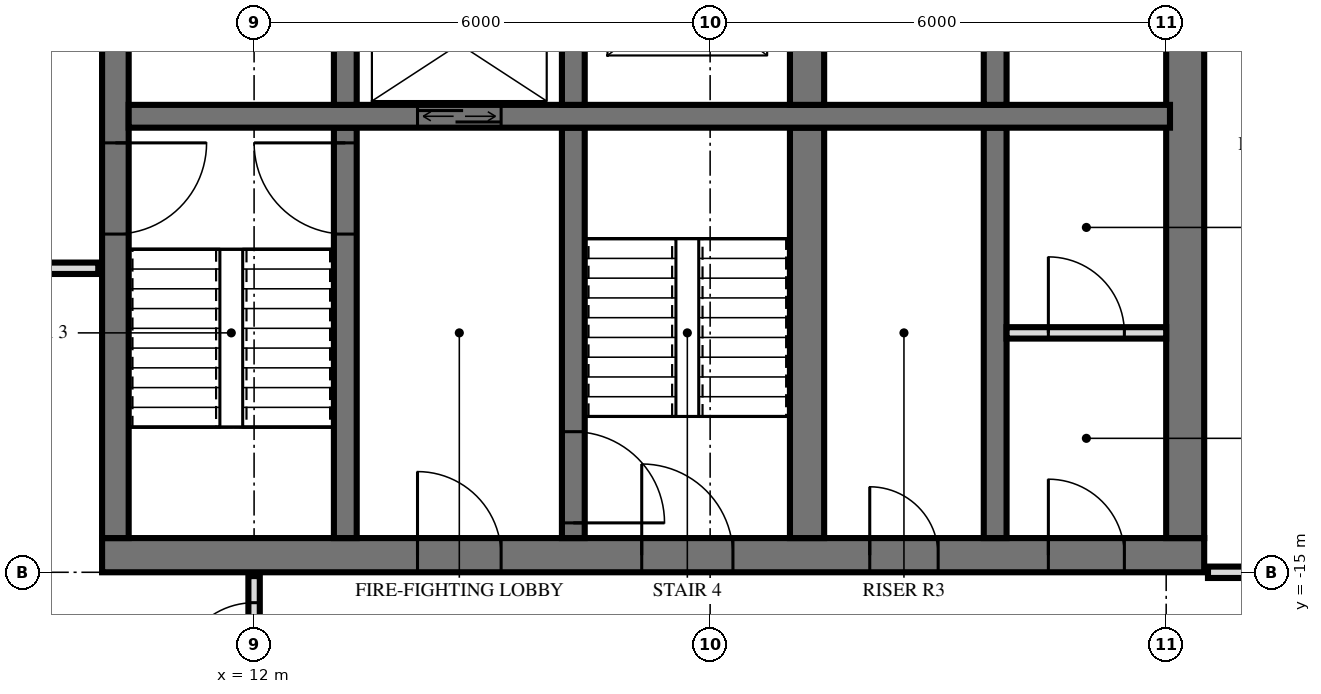
"""IFC4 building model, lengths in metres.
Left out: names, types, materials, properties, quantities, classifications, styles, units other than length and angle.
Written with IfcOpenShell. Run it as: python <this file> out.ifc"""

import sys

from ifc_helpers import new_model, si_unit, direction, frame, frame_2d, origin, place, context, subcontext, project, spatial, rectangle, extrude, element, fill, save


model = new_model("IFC4")
c1 = context("Model", 3, precision=1e-05, world=origin(), true_north=direction((0.0, 1.0)))
c2 = subcontext(c1, "Body", "Model", "MODEL_VIEW")
j1 = project(units=[si_unit("LENGTHUNIT", "METRE"), si_unit("PLANEANGLEUNIT", "RADIAN")], contexts=[c1])
p1 = place(None, origin())
s1 = spatial("IfcSite", under=j1, at=p1, CompositionType="ELEMENT")
p2 = place(p1, origin())
s2 = spatial("IfcBuilding", under=s1, at=p2, CompositionType="ELEMENT")
p3 = place(p2, frame((0.0, 0.0, 116.4)))
s3 = spatial("IfcBuildingStorey", under=s2, at=p3, CompositionType="ELEMENT", Elevation=116.4)
p4 = place(p3, frame((10.0, -14.775, 0.0), z_axis=(0.0, 0.0, 1.0), x_axis=(1.0, 0.0, 0.0)))
e1 = element("IfcWall", 1, at=p4, inside=s3, PredefinedType="SHEAR", context=c2, shape_type="SweptSolid", body=[
    extrude(rectangle(XDim=14.5, YDim=0.45, at=frame_2d((7.25, 0.0))), origin(), (0.0, 0.0, 1.0), 3.6),
])
p5 = place(p4, frame((7.1, 0.0, 0.0)))
e2 = element("IfcOpeningElement", 2, at=p5, cuts=e1, PredefinedType="OPENING", context=c2, shape_type="SweptSolid", body=[
    extrude(rectangle(XDim=1.2, YDim=2.1, at=frame_2d((0.6, 1.05))), frame((0.0, 0.235, 0.0), z_axis=(0.0, -1.0, 0.0), x_axis=(1.0, 0.0, 0.0)), (0.0, 0.0, 1.0), 0.47),
])
p6 = place(p4, frame((4.15, 0.0, 0.0)))
e3 = element("IfcOpeningElement", 3, at=p6, cuts=e1, PredefinedType="OPENING", context=c2, shape_type="SweptSolid", body=[
    extrude(rectangle(XDim=1.1, YDim=2.1, at=frame_2d((0.55, 1.05))), frame((0.0, 0.235, 0.0), z_axis=(0.0, -1.0, 0.0), x_axis=(1.0, 0.0, 0.0)), (0.0, 0.0, 1.0), 0.47),
])
p7 = place(p4, frame((10.1, 0.0, 0.0)))
e4 = element("IfcOpeningElement", 4, at=p7, cuts=e1, PredefinedType="OPENING", context=c2, shape_type="SweptSolid", body=[
    extrude(rectangle(XDim=0.9, YDim=2.1, at=frame_2d((0.45, 1.05))), frame((0.0, 0.235, 0.0), z_axis=(0.0, -1.0, 0.0), x_axis=(1.0, 0.0, 0.0)), (0.0, 0.0, 1.0), 0.47),
])
p8 = place(p4, frame((12.45, 0.0, 0.0)))
e5 = element("IfcOpeningElement", 5, at=p8, cuts=e1, PredefinedType="OPENING", context=c2, shape_type="SweptSolid", body=[
    extrude(rectangle(XDim=1.0, YDim=2.1, at=frame_2d((0.5, 1.05))), frame((0.0, 0.235, 0.0), z_axis=(0.0, -1.0, 0.0), x_axis=(1.0, 0.0, 0.0)), (0.0, 0.0, 1.0), 0.47),
])
p9 = place(p3, frame((10.175, -14.55, 0.0), z_axis=(0.0, 0.0, 1.0), x_axis=(0.0, 1.0, 0.0)))
e6 = element("IfcWall", 6, at=p9, inside=s3, PredefinedType="SHEAR", context=c2, shape_type="SweptSolid", body=[
    extrude(rectangle(XDim=14.1, YDim=0.35, at=frame_2d((7.05, 0.0))), origin(), (0.0, 0.0, 1.0), 3.6),
])
p10 = place(p9, frame((8.4, 0.0, 0.0)))
e7 = element("IfcOpeningElement", 7, at=p10, cuts=e6, PredefinedType="OPENING", context=c2, shape_type="SweptSolid", body=[
    extrude(rectangle(XDim=1.4, YDim=2.4, at=frame_2d((0.7, 1.2))), frame((0.0, 0.185, 0.0), z_axis=(0.0, -1.0, 0.0), x_axis=(1.0, 0.0, 0.0)), (0.0, 0.0, 1.0), 0.37),
])
p11 = place(p9, frame((10.0, 0.0, 0.0)))
e8 = element("IfcOpeningElement", 8, at=p11, cuts=e6, PredefinedType="OPENING", context=c2, shape_type="SweptSolid", body=[
    extrude(rectangle(XDim=1.4, YDim=2.4, at=frame_2d((0.7, 1.2))), frame((0.0, 0.185, 0.0), z_axis=(0.0, -1.0, 0.0), x_axis=(1.0, 0.0, 0.0)), (0.0, 0.0, 1.0), 0.37),
])
p12 = place(p9, frame((4.0, 0.0, 0.0)))
e9 = element("IfcOpeningElement", 9, at=p12, cuts=e6, PredefinedType="OPENING", context=c2, shape_type="SweptSolid", body=[
    extrude(rectangle(XDim=1.2, YDim=2.1, at=frame_2d((0.6, 1.05))), frame((0.0, 0.185, 0.0), z_axis=(0.0, -1.0, 0.0), x_axis=(1.0, 0.0, 0.0)), (0.0, 0.0, 1.0), 0.37),
])
p13 = place(p3, frame((24.25, -14.55, 0.0), z_axis=(0.0, 0.0, 1.0), x_axis=(0.0, 1.0, 0.0)))
e10 = element("IfcWall", 10, at=p13, inside=s3, PredefinedType="SHEAR", context=c2, shape_type="SweptSolid", body=[
    extrude(rectangle(XDim=14.1, YDim=0.5, at=frame_2d((7.05, 0.0))), origin(), (0.0, 0.0, 1.0), 3.6),
])
p14 = place(p3, frame((10.35, -9.0, 0.0), z_axis=(0.0, 0.0, 1.0), x_axis=(1.0, 0.0, 0.0)))
e11 = element("IfcWall", 11, at=p14, inside=s3, PredefinedType="SHEAR", context=c2, shape_type="SweptSolid", body=[
    extrude(rectangle(XDim=13.7, YDim=0.3, at=frame_2d((6.85, 0.0))), origin(), (0.0, 0.0, 1.0), 3.6),
])
p15 = place(p14, frame((3.8, 0.0, 0.0)))
e12 = element("IfcOpeningElement", 12, at=p15, cuts=e11, PredefinedType="OPENING", context=c2, shape_type="SweptSolid", body=[
    extrude(rectangle(XDim=1.1, YDim=2.1, at=frame_2d((0.55, 1.05))), frame((0.0, 0.16, 0.0), z_axis=(0.0, -1.0, 0.0), x_axis=(1.0, 0.0, 0.0)), (0.0, 0.0, 1.0), 0.32),
])
p16 = place(p3, frame((13.2, -8.85, 0.0), z_axis=(0.0, 0.0, 1.0), x_axis=(0.0, 1.0, 0.0)))
e13 = element("IfcWall", 13, at=p16, inside=s3, PredefinedType="SHEAR", context=c2, shape_type="SweptSolid", body=[
    extrude(rectangle(XDim=2.3, YDim=0.3, at=frame_2d((1.15, 0.0))), origin(), (0.0, 0.0, 1.0), 3.6),
])
p17 = place(p3, frame((13.2, -14.55, 0.0), z_axis=(0.0, 0.0, 1.0), x_axis=(0.0, 1.0, 0.0)))
e14 = element("IfcWall", 14, at=p17, inside=s3, PredefinedType="SHEAR", context=c2, shape_type="SweptSolid", body=[
    extrude(rectangle(XDim=5.4, YDim=0.3, at=frame_2d((2.7, 0.0))), origin(), (0.0, 0.0, 1.0), 3.6),
])
p18 = place(p17, frame((4.0, 0.0, 0.0)))
e15 = element("IfcOpeningElement", 15, at=p18, cuts=e14, PredefinedType="OPENING", context=c2, shape_type="SweptSolid", body=[
    extrude(rectangle(XDim=1.2, YDim=2.1, at=frame_2d((0.6, 1.05))), frame((0.0, 0.16, 0.0), z_axis=(0.0, -1.0, 0.0), x_axis=(1.0, 0.0, 0.0)), (0.0, 0.0, 1.0), 0.32),
])
p19 = place(p3, frame((16.2, -8.85, 0.0), z_axis=(0.0, 0.0, 1.0), x_axis=(0.0, 1.0, 0.0)))
e16 = element("IfcWall", 16, at=p19, inside=s3, PredefinedType="SHEAR", context=c2, shape_type="SweptSolid", body=[
    extrude(rectangle(XDim=2.3, YDim=0.3, at=frame_2d((1.15, 0.0))), origin(), (0.0, 0.0, 1.0), 3.6),
])
p20 = place(p3, frame((16.2, -14.55, 0.0), z_axis=(0.0, 0.0, 1.0), x_axis=(0.0, 1.0, 0.0)))
e17 = element("IfcWall", 17, at=p20, inside=s3, PredefinedType="SHEAR", context=c2, shape_type="SweptSolid", body=[
    extrude(rectangle(XDim=5.4, YDim=0.3, at=frame_2d((2.7, 0.0))), origin(), (0.0, 0.0, 1.0), 3.6),
])
p21 = place(p20, frame((0.2, 0.0, 0.0)))
e18 = element("IfcOpeningElement", 18, at=p21, cuts=e17, PredefinedType="OPENING", context=c2, shape_type="SweptSolid", body=[
    extrude(rectangle(XDim=1.2, YDim=2.1, at=frame_2d((0.6, 1.05))), frame((0.0, 0.16, 0.0), z_axis=(0.0, -1.0, 0.0), x_axis=(1.0, 0.0, 0.0)), (0.0, 0.0, 1.0), 0.32),
])
p22 = place(p3, frame((19.275, -8.85, 0.0), z_axis=(0.0, 0.0, 1.0), x_axis=(0.0, 1.0, 0.0)))
e19 = element("IfcWall", 19, at=p22, inside=s3, PredefinedType="SHEAR", context=c2, shape_type="SweptSolid", body=[
    extrude(rectangle(XDim=2.3, YDim=0.45, at=frame_2d((1.15, 0.0))), origin(), (0.0, 0.0, 1.0), 3.6),
])
p23 = place(p3, frame((19.275, -14.55, 0.0), z_axis=(0.0, 0.0, 1.0), x_axis=(0.0, 1.0, 0.0)))
e20 = element("IfcWall", 20, at=p23, inside=s3, PredefinedType="SHEAR", context=c2, shape_type="SweptSolid", body=[
    extrude(rectangle(XDim=5.4, YDim=0.45, at=frame_2d((2.7, 0.0))), origin(), (0.0, 0.0, 1.0), 3.6),
])
p24 = place(p3, frame((21.75, -8.85, 0.0), z_axis=(0.0, 0.0, 1.0), x_axis=(0.0, 1.0, 0.0)))
e21 = element("IfcWall", 21, at=p24, inside=s3, PredefinedType="SHEAR", context=c2, shape_type="SweptSolid", body=[
    extrude(rectangle(XDim=2.3, YDim=0.3, at=frame_2d((1.15, 0.0))), origin(), (0.0, 0.0, 1.0), 3.6),
])
p25 = place(p3, frame((21.75, -14.55, 0.0), z_axis=(0.0, 0.0, 1.0), x_axis=(0.0, 1.0, 0.0)))
e22 = element("IfcWall", 22, at=p25, inside=s3, PredefinedType="SHEAR", context=c2, shape_type="SweptSolid", body=[
    extrude(rectangle(XDim=5.4, YDim=0.3, at=frame_2d((2.7, 0.0))), origin(), (0.0, 0.0, 1.0), 3.6),
])
p26 = place(p3, frame((21.9, -11.85, 0.0), z_axis=(0.0, 0.0, 1.0), x_axis=(1.0, 0.0, 0.0)))
e23 = element("IfcWall", 23, at=p26, inside=s3, PredefinedType="PARTITIONING", context=c2, shape_type="SweptSolid", body=[
    extrude(rectangle(XDim=2.1, YDim=0.15, at=frame_2d((1.05, 0.0))), origin(), (0.0, 0.0, 1.0), 3.3),
])
p27 = place(p26, frame((0.55, 0.0, 0.0)))
e24 = element("IfcOpeningElement", 24, at=p27, cuts=e23, PredefinedType="OPENING", context=c2, shape_type="SweptSolid", body=[
    extrude(rectangle(XDim=1.0, YDim=2.1, at=frame_2d((0.5, 1.05))), frame((0.0, 0.085, 0.0), z_axis=(0.0, -1.0, 0.0), x_axis=(1.0, 0.0, 0.0)), (0.0, 0.0, 1.0), 0.17),
])
p28 = place(p3, frame((12.0, -16.8, 0.0), z_axis=(0.0, 0.0, 1.0), x_axis=(0.0, 1.0, 0.0)))
e25 = element("IfcWall", 25, at=p28, inside=s3, PredefinedType="PARTITIONING", context=c2, shape_type="SweptSolid", body=[
    extrude(rectangle(XDim=1.75, YDim=0.15, at=frame_2d((0.875, 0.0))), origin(), (0.0, 0.0, 1.0), 3.32),
])
p29 = place(p28, frame((0.4, 0.0, 0.0)))
e26 = element("IfcOpeningElement", 26, at=p29, cuts=e25, PredefinedType="OPENING", context=c2, shape_type="SweptSolid", body=[
    extrude(rectangle(XDim=1.0, YDim=2.1, at=frame_2d((0.5, 1.05))), frame((0.0, 0.085, 0.0), z_axis=(0.0, -1.0, 0.0), x_axis=(1.0, 0.0, 0.0)), (0.0, 0.0, 1.0), 0.17),
])
p30 = place(p3, frame((24.55, -15.0, 0.0), z_axis=(0.0, 0.0, 1.0), x_axis=(1.0, 0.0, 0.0)))
e27 = element("IfcWall", 27, at=p30, inside=s3, PredefinedType="PARTITIONING", context=c2, shape_type="SweptSolid", body=[
    extrude(rectangle(XDim=3.47, YDim=0.15, at=frame_2d((1.735, 0.0))), origin(), (0.0, 0.0, 1.0), 3.32),
])
p31 = place(p30, frame((0.9, 0.0, 0.0)))
e28 = element("IfcOpeningElement", 28, at=p31, cuts=e27, PredefinedType="OPENING", context=c2, shape_type="SweptSolid", body=[
    extrude(rectangle(XDim=1.0, YDim=2.1, at=frame_2d((0.5, 1.05))), frame((0.0, 0.085, 0.0), z_axis=(0.0, -1.0, 0.0), x_axis=(1.0, 0.0, 0.0)), (0.0, 0.0, 1.0), 0.17),
])
p32 = place(p3, frame((-9.95, -11.0, 0.0), z_axis=(0.0, 0.0, 1.0), x_axis=(1.0, 0.0, 0.0)))
e29 = element("IfcWall", 29, at=p32, inside=s3, PredefinedType="PARTITIONING", context=c2, shape_type="SweptSolid", body=[
    extrude(rectangle(XDim=19.9, YDim=0.15, at=frame_2d((9.95, 0.0))), origin(), (0.0, 0.0, 1.0), 3.32),
])
p33 = place(p32, frame((9.45, 0.0, 0.0)))
e30 = element("IfcOpeningElement", 30, at=p33, cuts=e29, PredefinedType="OPENING", context=c2, shape_type="SweptSolid", body=[
    extrude(rectangle(XDim=1.0, YDim=2.1, at=frame_2d((0.5, 1.05))), frame((0.0, 0.085, 0.0), z_axis=(0.0, -1.0, 0.0), x_axis=(1.0, 0.0, 0.0)), (0.0, 0.0, 1.0), 0.17),
])
p34 = place(p32, frame((15.45, 0.0, 0.0)))
e31 = element("IfcOpeningElement", 31, at=p34, cuts=e29, PredefinedType="OPENING", context=c2, shape_type="SweptSolid", body=[
    extrude(rectangle(XDim=1.0, YDim=2.1, at=frame_2d((0.5, 1.05))), frame((0.0, 0.085, 0.0), z_axis=(0.0, -1.0, 0.0), x_axis=(1.0, 0.0, 0.0)), (0.0, 0.0, 1.0), 0.17),
])
p35 = place(p15, origin())
e32 = element("IfcDoor", 32, at=p35, inside=s3, OperationType="DOUBLE_DOOR_SLIDING", PredefinedType="USERDEFINED", context=c2, shape_type="SweptSolid", body=[
    extrude(rectangle(XDim=1.1, YDim=2.1, at=frame_2d((0.55, 1.05))), frame((0.0, 0.025, 0.0), z_axis=(0.0, -1.0, 0.0), x_axis=(1.0, 0.0, 0.0)), (0.0, 0.0, 1.0), 0.05),
])
fill(e12, e32)
p36 = place(p12, frame((0.6, 0.0, 0.0), z_axis=(0.0, 0.0, 1.0), x_axis=(-1.0, 0.0, 0.0)))
e33 = element("IfcDoor", 33, at=p36, inside=s3, OperationType="SINGLE_SWING_RIGHT", PredefinedType="DOOR", context=c2, shape_type="SweptSolid", body=[
    extrude(rectangle(XDim=1.2, YDim=2.1, at=frame_2d((0.0, 1.05))), frame((0.0, -0.025, 0.0), z_axis=(0.0, 1.0, 0.0), x_axis=(-1.0, 0.0, 0.0)), (0.0, 0.0, 1.0), 0.05),
])
fill(e9, e33)
p37 = place(p5, origin())
e34 = element("IfcDoor", 34, at=p37, inside=s3, OperationType="SINGLE_SWING_RIGHT", PredefinedType="DOOR", context=c2, shape_type="SweptSolid", body=[
    extrude(rectangle(XDim=1.2, YDim=2.1, at=frame_2d((0.6, 1.05))), frame((0.0, 0.025, 0.0), z_axis=(0.0, -1.0, 0.0), x_axis=(1.0, 0.0, 0.0)), (0.0, 0.0, 1.0), 0.05),
])
fill(e2, e34)
p38 = place(p6, origin())
e35 = element("IfcDoor", 35, at=p38, inside=s3, OperationType="SINGLE_SWING_RIGHT", PredefinedType="DOOR", context=c2, shape_type="SweptSolid", body=[
    extrude(rectangle(XDim=1.1, YDim=2.1, at=frame_2d((0.55, 1.05))), frame((0.0, 0.025, 0.0), z_axis=(0.0, -1.0, 0.0), x_axis=(1.0, 0.0, 0.0)), (0.0, 0.0, 1.0), 0.05),
])
fill(e3, e35)
p39 = place(p7, origin())
e36 = element("IfcDoor", 36, at=p39, inside=s3, OperationType="SINGLE_SWING_RIGHT", PredefinedType="DOOR", context=c2, shape_type="SweptSolid", body=[
    extrude(rectangle(XDim=0.9, YDim=2.1, at=frame_2d((0.45, 1.05))), frame((0.0, 0.025, 0.0), z_axis=(0.0, -1.0, 0.0), x_axis=(1.0, 0.0, 0.0)), (0.0, 0.0, 1.0), 0.05),
])
fill(e4, e36)
p40 = place(p8, origin())
e37 = element("IfcDoor", 37, at=p40, inside=s3, OperationType="SINGLE_SWING_RIGHT", PredefinedType="DOOR", context=c2, shape_type="SweptSolid", body=[
    extrude(rectangle(XDim=1.0, YDim=2.1, at=frame_2d((0.5, 1.05))), frame((0.0, 0.025, 0.0), z_axis=(0.0, -1.0, 0.0), x_axis=(1.0, 0.0, 0.0)), (0.0, 0.0, 1.0), 0.05),
])
fill(e5, e37)
p41 = place(p18, origin())
e38 = element("IfcDoor", 38, at=p41, inside=s3, OperationType="SINGLE_SWING_LEFT", PredefinedType="DOOR", context=c2, shape_type="SweptSolid", body=[
    extrude(rectangle(XDim=1.2, YDim=2.1, at=frame_2d((0.6, 1.05))), frame((0.0, 0.025, 0.0), z_axis=(0.0, -1.0, 0.0), x_axis=(1.0, 0.0, 0.0)), (0.0, 0.0, 1.0), 0.05),
])
fill(e15, e38)
p42 = place(p21, frame((0.6, 0.0, 0.0), z_axis=(0.0, 0.0, 1.0), x_axis=(-1.0, 0.0, 0.0)))
e39 = element("IfcDoor", 39, at=p42, inside=s3, OperationType="SINGLE_SWING_LEFT", PredefinedType="DOOR", context=c2, shape_type="SweptSolid", body=[
    extrude(rectangle(XDim=1.2, YDim=2.1, at=frame_2d((0.0, 1.05))), frame((0.0, -0.025, 0.0), z_axis=(0.0, 1.0, 0.0), x_axis=(-1.0, 0.0, 0.0)), (0.0, 0.0, 1.0), 0.05),
])
fill(e18, e39)
p43 = place(p27, origin())
e40 = element("IfcDoor", 40, at=p43, inside=s3, OperationType="SINGLE_SWING_RIGHT", PredefinedType="DOOR", context=c2, shape_type="SweptSolid", body=[
    extrude(rectangle(XDim=1.0, YDim=2.1, at=frame_2d((0.5, 1.05))), frame((0.0, 0.025, 0.0), z_axis=(0.0, -1.0, 0.0), x_axis=(1.0, 0.0, 0.0)), (0.0, 0.0, 1.0), 0.05),
])
fill(e24, e40)
p44 = place(p29, origin())
e41 = element("IfcDoor", 41, at=p44, inside=s3, OperationType="SINGLE_SWING_RIGHT", PredefinedType="DOOR", context=c2, shape_type="SweptSolid", body=[
    extrude(rectangle(XDim=1.0, YDim=2.1, at=frame_2d((0.5, 1.05))), frame((0.0, 0.025, 0.0), z_axis=(0.0, -1.0, 0.0), x_axis=(1.0, 0.0, 0.0)), (0.0, 0.0, 1.0), 0.05),
])
fill(e26, e41)
save(model, sys.argv[1])
